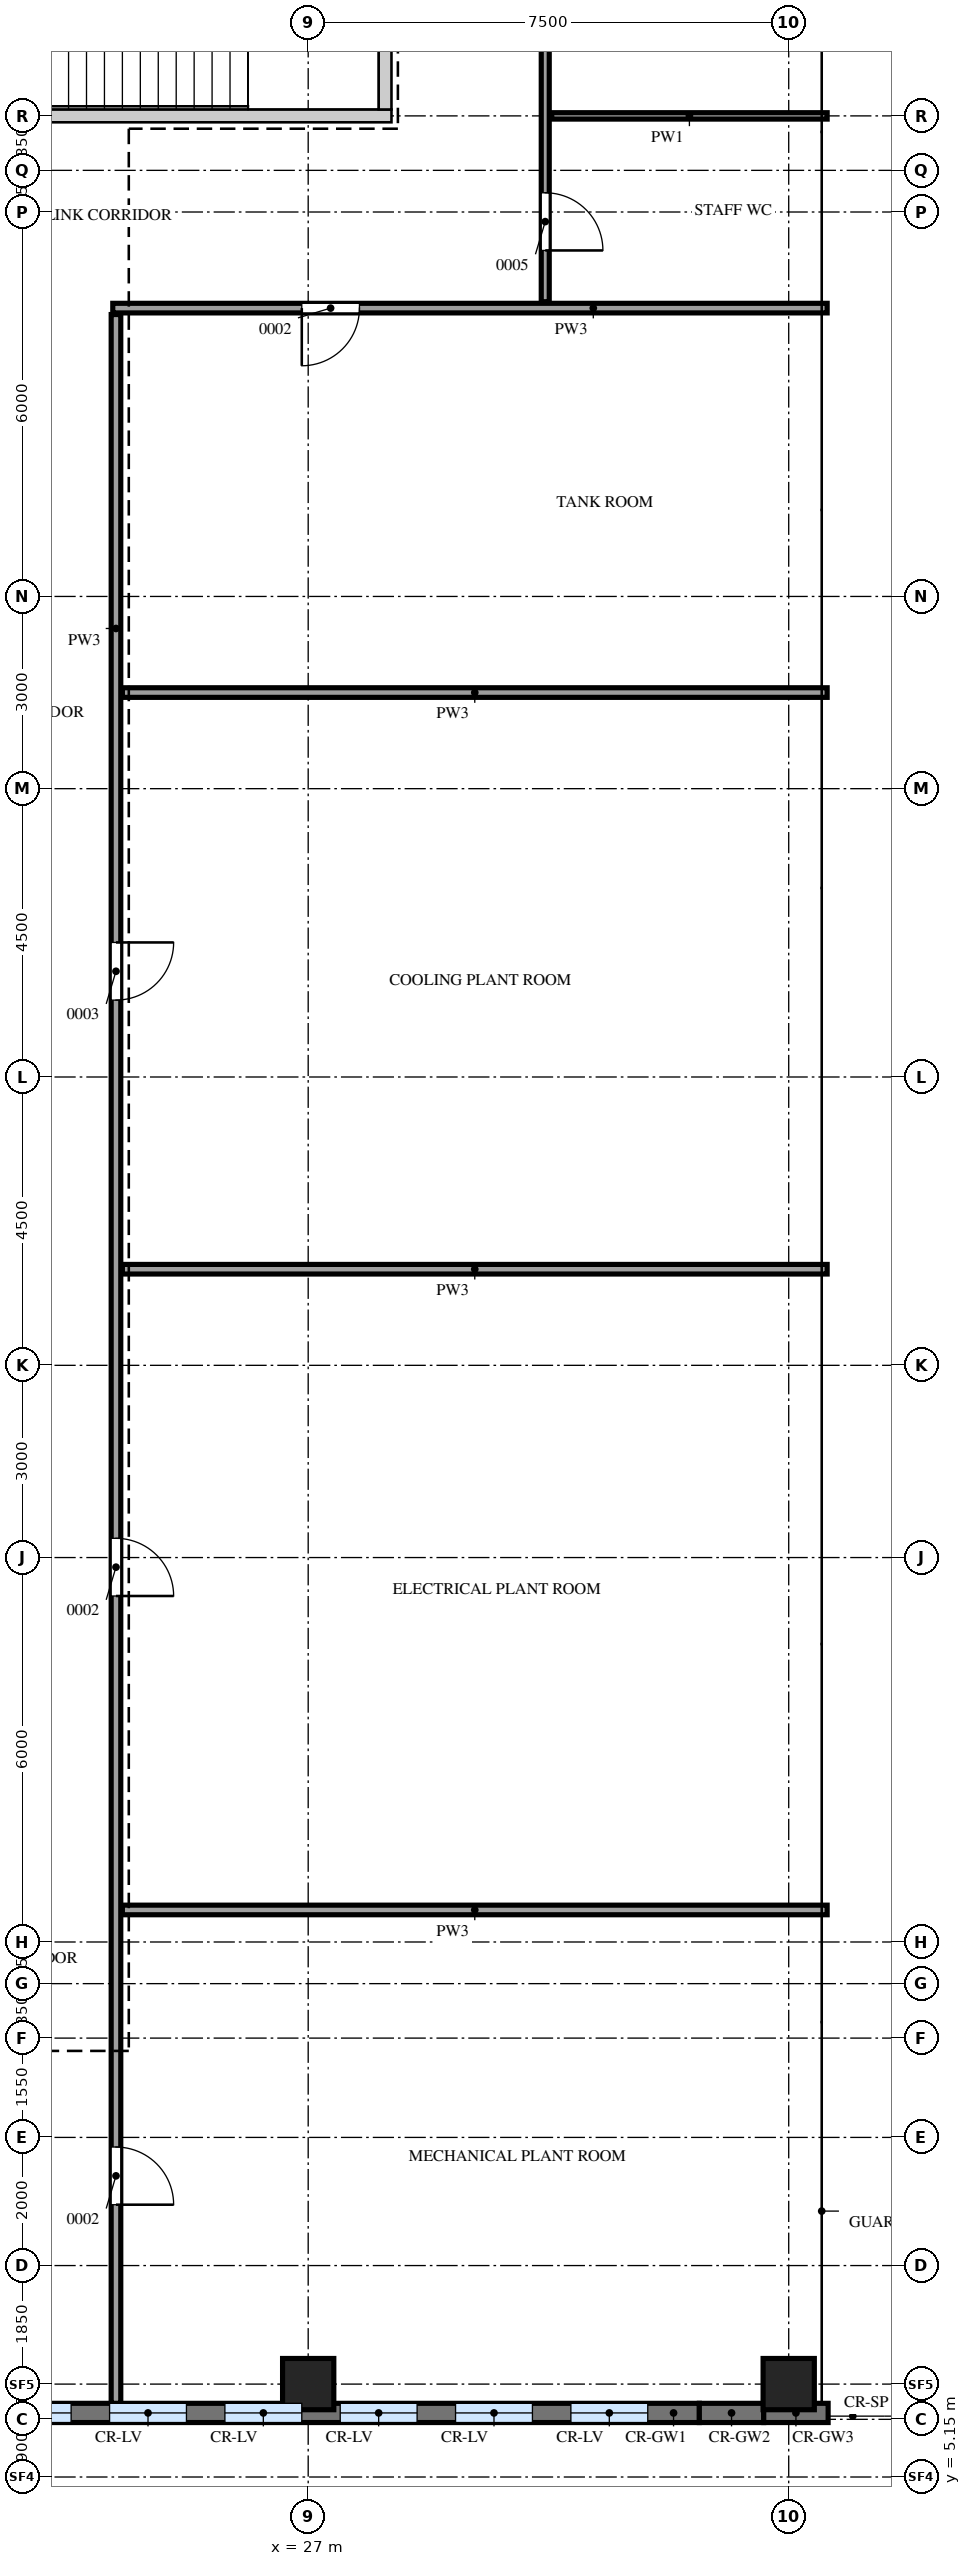
"""IFC4 building model, lengths in metres.
Left out: names, types, materials, properties, quantities, classifications, styles, units other than length and angle.
Written with IfcOpenShell. Run it as: python <this file> out.ifc"""

import sys

from ifc_helpers import new_model, si_unit, direction, frame, frame_2d, origin, origin_2d, place, context, subcontext, project, spatial, rectangle, extrude, source, transform, mapped, element, fill, save


model = new_model("IFC4")
c1 = context("Model", 3, precision=1e-05, world=origin(), true_north=direction((0.0, 1.0)))
c2 = subcontext(c1, "Body", "Model", "MODEL_VIEW")
j1 = project(units=[si_unit("LENGTHUNIT", "METRE"), si_unit("PLANEANGLEUNIT", "RADIAN")], contexts=[c1])
p1 = place(None, origin())
s1 = spatial("IfcSite", under=j1, at=p1, CompositionType="ELEMENT")
p2 = place(p1, origin())
s2 = spatial("IfcBuilding", under=s1, at=p2, CompositionType="ELEMENT")
p3 = place(p2, frame((0.0, 0.0, 334.7)))
s3 = spatial("IfcBuildingStorey", under=s2, at=p3, CompositionType="ELEMENT", Elevation=334.7)
m1 = source(origin(), c2, "Body", "SweptSolid", [
    extrude(rectangle(XDim=7.1, YDim=0.2, at=frame_2d((3.55, 0.0))), origin(), (0.0, 0.0, 1.0), 4.25),
])
p4 = place(p3, frame((21.2, 42.0, 0.0), z_axis=(0.0, 0.0, 1.0), x_axis=(1.0, 0.0, 0.0)))
e1 = element("IfcWall", 1, at=p4, inside=s3, PredefinedType="SHEAR", context=c2, shape_type="MappedRepresentation", body=[
    mapped(m1, transform((0.0, 0.0, 0.0))),
])
m2 = source(origin(), c2, "Body", "SweptSolid", [
    extrude(rectangle(XDim=3.35, YDim=0.2, at=frame_2d((1.675, 0.0))), origin(), (0.0, 0.0, 1.0), 4.25),
])
p5 = place(p3, frame((28.2, 42.1, 0.0), z_axis=(0.0, 0.0, 1.0), x_axis=(0.0, 1.0, 0.0)))
e2 = element("IfcWall", 2, at=p5, inside=s3, PredefinedType="SHEAR", context=c2, shape_type="MappedRepresentation", body=[
    mapped(m2, transform((0.0, 0.0, 0.0))),
])
m3 = source(origin(), c2, "Body", "SweptSolid", [
    extrude(rectangle(XDim=0.8, YDim=0.8, at=origin_2d()), origin(), (0.0, 0.0, 1.0), 4.5),
])
p6 = place(p3, frame((27.0, 6.6, 0.0), z_axis=(0.0, 0.0, 1.0), x_axis=(1.0, 0.0, 0.0)))
e3 = element("IfcColumn", 3, at=p6, inside=s3, PredefinedType="COLUMN", context=c2, shape_type="MappedRepresentation", body=[
    mapped(m3, transform((0.0, 0.0, 0.0))),
])
m4 = source(origin(), c2, "Body", "SweptSolid", [
    extrude(rectangle(XDim=0.8, YDim=0.8, at=origin_2d()), origin(), (0.0, 0.0, 1.0), 1.739),
])
p7 = place(p3, frame((34.5, 6.6, 0.0), z_axis=(0.0, 0.0, 1.0), x_axis=(1.0, 0.0, 0.0)))
e4 = element("IfcColumn", 4, at=p7, inside=s3, PredefinedType="COLUMN", context=c2, shape_type="MappedRepresentation", body=[
    mapped(m4, transform((0.0, 0.0, 0.0))),
])
m5 = source(origin(), c2, "Body", "SweptSolid", [
    extrude(rectangle(XDim=20.805, YDim=0.3, at=frame_2d((10.403, 0.0))), origin(), (0.0, 0.0, 1.0), 4.5),
])
p8 = place(p3, frame((12.3, 6.15, 0.0), z_axis=(0.0, 0.0, 1.0), x_axis=(1.0, 0.0, 0.0)))
e5 = element("IfcWall", 5, at=p8, inside=s3, PredefinedType="SOLIDWALL", context=c2, shape_type="MappedRepresentation", body=[
    mapped(m5, transform((0.0, 0.0, 0.0))),
])
m6 = source(origin(), c2, "Body", "SweptSolid", [
    extrude(rectangle(XDim=1.2, YDim=2.4, at=frame_2d((0.6, 1.2))), frame((0.0, 0.16, 0.0), z_axis=(0.0, -1.0, 0.0), x_axis=(1.0, 0.0, 0.0)), (0.0, 0.0, 1.0), 0.32),
])
p9 = place(p8, frame((0.8, 0.0, 0.9)))
e6 = element("IfcOpeningElement", 6, at=p9, cuts=e5, PredefinedType="OPENING", context=c2, shape_type="MappedRepresentation", body=[
    mapped(m6, transform((0.0, 0.0, 0.0))),
])
p10 = place(p8, frame((2.6, 0.0, 0.9)))
e7 = element("IfcOpeningElement", 7, at=p10, cuts=e5, PredefinedType="OPENING", context=c2, shape_type="MappedRepresentation", body=[
    mapped(m6, transform((0.0, 0.0, 0.0))),
])
p11 = place(p8, frame((4.4, 0.0, 0.9)))
e8 = element("IfcOpeningElement", 8, at=p11, cuts=e5, PredefinedType="OPENING", context=c2, shape_type="MappedRepresentation", body=[
    mapped(m6, transform((0.0, 0.0, 0.0))),
])
p12 = place(p8, frame((6.2, 0.0, 0.9)))
e9 = element("IfcOpeningElement", 9, at=p12, cuts=e5, PredefinedType="OPENING", context=c2, shape_type="MappedRepresentation", body=[
    mapped(m6, transform((0.0, 0.0, 0.0))),
])
p13 = place(p8, frame((8.0, 0.0, 0.9)))
e10 = element("IfcOpeningElement", 10, at=p13, cuts=e5, PredefinedType="OPENING", context=c2, shape_type="MappedRepresentation", body=[
    mapped(m6, transform((0.0, 0.0, 0.0))),
])
p14 = place(p8, frame((9.8, 0.0, 0.9)))
e11 = element("IfcOpeningElement", 11, at=p14, cuts=e5, PredefinedType="OPENING", context=c2, shape_type="MappedRepresentation", body=[
    mapped(m6, transform((0.0, 0.0, 0.0))),
])
p15 = place(p8, frame((11.6, 0.0, 0.9)))
e12 = element("IfcOpeningElement", 12, at=p15, cuts=e5, PredefinedType="OPENING", context=c2, shape_type="MappedRepresentation", body=[
    mapped(m6, transform((0.0, 0.0, 0.0))),
])
p16 = place(p8, frame((13.4, 0.0, 0.9)))
e13 = element("IfcOpeningElement", 13, at=p16, cuts=e5, PredefinedType="OPENING", context=c2, shape_type="MappedRepresentation", body=[
    mapped(m6, transform((0.0, 0.0, 0.0))),
])
p17 = place(p8, frame((15.2, 0.0, 0.9)))
e14 = element("IfcOpeningElement", 14, at=p17, cuts=e5, PredefinedType="OPENING", context=c2, shape_type="MappedRepresentation", body=[
    mapped(m6, transform((0.0, 0.0, 0.0))),
])
p18 = place(p8, frame((17.0, 0.0, 0.9)))
e15 = element("IfcOpeningElement", 15, at=p18, cuts=e5, PredefinedType="OPENING", context=c2, shape_type="MappedRepresentation", body=[
    mapped(m6, transform((0.0, 0.0, 0.0))),
])
p19 = place(p8, frame((18.8, 0.0, 0.9)))
e16 = element("IfcOpeningElement", 16, at=p19, cuts=e5, PredefinedType="OPENING", context=c2, shape_type="MappedRepresentation", body=[
    mapped(m6, transform((0.0, 0.0, 0.0))),
])
m7 = source(origin(), c2, "Body", "SweptSolid", [
    extrude(rectangle(XDim=1.005, YDim=0.3, at=frame_2d((0.502, 0.0))), origin(), (0.0, 0.0, 1.0), 4.05),
])
p20 = place(p3, frame((33.105, 6.15, 0.0), z_axis=(0.0, 0.0, 1.0), x_axis=(1.0, 0.0, 0.0)))
e17 = element("IfcWall", 17, at=p20, inside=s3, PredefinedType="SOLIDWALL", context=c2, shape_type="MappedRepresentation", body=[
    mapped(m7, transform((0.0, 0.0, 0.0))),
])
m8 = source(origin(), c2, "Body", "SweptSolid", [
    extrude(rectangle(XDim=1.005, YDim=0.3, at=frame_2d((0.502, 0.0))), origin(), (0.0, 0.0, 1.0), 2.3),
])
p21 = place(p3, frame((34.11, 6.15, 0.0), z_axis=(0.0, 0.0, 1.0), x_axis=(1.0, 0.0, 0.0)))
e18 = element("IfcWall", 18, at=p21, inside=s3, PredefinedType="SOLIDWALL", context=c2, shape_type="MappedRepresentation", body=[
    mapped(m8, transform((0.0, 0.0, 0.0))),
])
m9 = source(origin(), c2, "Body", "SweptSolid", [
    extrude(rectangle(XDim=32.6, YDim=0.15, at=frame_2d((16.3, 0.0))), origin(), (0.0, 0.0, 1.0), 4.3),
])
p22 = place(p3, frame((24.0, 6.3, 0.0), z_axis=(0.0, 0.0, 1.0), x_axis=(0.0, 1.0, 0.0)))
e19 = element("IfcWall", 19, at=p22, inside=s3, PredefinedType="PARTITIONING", context=c2, shape_type="MappedRepresentation", body=[
    mapped(m9, transform((0.0, 0.0, 0.0))),
])
m10 = source(origin(), c2, "Body", "SweptSolid", [
    extrude(rectangle(XDim=0.9, YDim=2.1, at=frame_2d((0.45, 1.05))), frame((0.0, 0.085, 0.0), z_axis=(0.0, -1.0, 0.0), x_axis=(1.0, 0.0, 0.0)), (0.0, 0.0, 1.0), 0.17),
])
p23 = place(p22, frame((3.1, 0.0, 0.0)))
e20 = element("IfcOpeningElement", 20, at=p23, cuts=e19, PredefinedType="OPENING", context=c2, shape_type="MappedRepresentation", body=[
    mapped(m10, transform((0.0, 0.0, 0.0))),
])
p24 = place(p22, frame((12.6, 0.0, 0.0)))
e21 = element("IfcOpeningElement", 21, at=p24, cuts=e19, PredefinedType="OPENING", context=c2, shape_type="MappedRepresentation", body=[
    mapped(m10, transform((0.0, 0.0, 0.0))),
])
p25 = place(p22, frame((21.9, 0.0, 0.0)))
e22 = element("IfcOpeningElement", 22, at=p25, cuts=e19, PredefinedType="OPENING", context=c2, shape_type="MappedRepresentation", body=[
    mapped(m10, transform((0.0, 0.0, 0.0))),
])
m11 = source(origin(), c2, "Body", "SweptSolid", [
    extrude(rectangle(XDim=11.0, YDim=0.15, at=frame_2d((5.5, 0.0))), origin(), (0.0, 0.0, 1.0), 4.3),
])
for number, where, z_axis, x_axis in (
    (23, (24.1, 14.0, 0.0), (0.0, 0.0, 1.0), (1.0, 0.0, 0.0)),
    (24, (24.1, 24.0, 0.0), (0.0, 0.0, 1.0), (1.0, 0.0, 0.0)),
    (25, (24.1, 33.0, 0.0), (0.0, 0.0, 1.0), (1.0, 0.0, 0.0)),
):
    element("IfcWall", number, at=place(p3, frame(where, z_axis=z_axis, x_axis=x_axis)), inside=s3, PredefinedType="PARTITIONING", context=c2, shape_type="MappedRepresentation", body=[
        mapped(m11, transform((0.0, 0.0, 0.0))),
    ])
m12 = source(origin(), c2, "Body", "SweptSolid", [
    extrude(rectangle(XDim=11.15, YDim=0.15, at=frame_2d((5.575, 0.0))), origin(), (0.0, 0.0, 1.0), 4.3),
])
p26 = place(p3, frame((23.95, 39.0, 0.0), z_axis=(0.0, 0.0, 1.0), x_axis=(1.0, 0.0, 0.0)))
e26 = element("IfcWall", 26, at=p26, inside=s3, PredefinedType="PARTITIONING", context=c2, shape_type="MappedRepresentation", body=[
    mapped(m12, transform((0.0, 0.0, 0.0))),
])
p27 = place(p26, frame((2.95, 0.0, 0.0)))
e27 = element("IfcOpeningElement", 27, at=p27, cuts=e26, PredefinedType="OPENING", context=c2, shape_type="MappedRepresentation", body=[
    mapped(m10, transform((0.0, 0.0, 0.0))),
])
m13 = source(origin(), c2, "Body", "SweptSolid", [
    extrude(rectangle(XDim=8.6, YDim=0.125, at=frame_2d((4.3, 0.0))), origin(), (0.0, 0.0, 1.0), 4.3),
])
p28 = place(p3, frame((30.7, 39.1, 0.0), z_axis=(0.0, 0.0, 1.0), x_axis=(0.0, 1.0, 0.0)))
e28 = element("IfcWall", 28, at=p28, inside=s3, PredefinedType="PARTITIONING", context=c2, shape_type="MappedRepresentation", body=[
    mapped(m13, transform((0.0, 0.0, 0.0))),
])
m14 = source(origin(), c2, "Body", "SweptSolid", [
    extrude(rectangle(XDim=0.9, YDim=2.1, at=frame_2d((0.45, 1.05))), frame((0.0, 0.073, 0.0), z_axis=(0.0, -1.0, 0.0), x_axis=(1.0, 0.0, 0.0)), (0.0, 0.0, 1.0), 0.145),
])
p29 = place(p28, frame((0.8, 0.0, 0.0)))
e29 = element("IfcOpeningElement", 29, at=p29, cuts=e28, PredefinedType="OPENING", context=c2, shape_type="MappedRepresentation", body=[
    mapped(m14, transform((0.0, 0.0, 0.0))),
])
m15 = source(origin(), c2, "Body", "SweptSolid", [
    extrude(rectangle(XDim=1.2, YDim=2.1, at=frame_2d((0.6, 1.05))), frame((0.0, 0.073, 0.0), z_axis=(0.0, -1.0, 0.0), x_axis=(1.0, 0.0, 0.0)), (0.0, 0.0, 1.0), 0.145),
])
p30 = place(p28, frame((4.1, 0.0, 0.0)))
e30 = element("IfcOpeningElement", 30, at=p30, cuts=e28, PredefinedType="OPENING", context=c2, shape_type="MappedRepresentation", body=[
    mapped(m15, transform((0.0, 0.0, 0.0))),
])
m16 = source(origin(), c2, "Body", "SweptSolid", [
    extrude(rectangle(XDim=4.3, YDim=0.1, at=frame_2d((2.15, 0.0))), origin(), (0.0, 0.0, 1.0), 4.3),
])
p31 = place(p3, frame((30.8, 42.0, 0.0), z_axis=(0.0, 0.0, 1.0), x_axis=(1.0, 0.0, 0.0)))
e31 = element("IfcWall", 31, at=p31, inside=s3, PredefinedType="PARTITIONING", context=c2, shape_type="MappedRepresentation", body=[
    mapped(m16, transform((0.0, 0.0, 0.0))),
])
m17 = source(origin(), c2, "Body", "SweptSolid", [
    extrude(rectangle(XDim=1.2, YDim=2.4, at=frame_2d((0.6, 1.2))), frame((0.0, 0.03, 0.0), z_axis=(0.0, -1.0, 0.0), x_axis=(1.0, 0.0, 0.0)), (0.0, 0.0, 1.0), 0.06),
])
p32 = place(p14, origin())
e32 = element("IfcWindow", 32, at=p32, inside=s3, PartitioningType="SINGLE_PANEL", PredefinedType="WINDOW", context=c2, shape_type="MappedRepresentation", body=[
    mapped(m17, transform((0.0, 0.0, 0.0))),
])
fill(e11, e32)
p33 = place(p15, origin())
e33 = element("IfcWindow", 33, at=p33, inside=s3, PartitioningType="SINGLE_PANEL", PredefinedType="WINDOW", context=c2, shape_type="MappedRepresentation", body=[
    mapped(m17, transform((0.0, 0.0, 0.0))),
])
fill(e12, e33)
p34 = place(p16, origin())
e34 = element("IfcWindow", 34, at=p34, inside=s3, PartitioningType="SINGLE_PANEL", PredefinedType="WINDOW", context=c2, shape_type="MappedRepresentation", body=[
    mapped(m17, transform((0.0, 0.0, 0.0))),
])
fill(e13, e34)
p35 = place(p17, origin())
e35 = element("IfcWindow", 35, at=p35, inside=s3, PartitioningType="SINGLE_PANEL", PredefinedType="WINDOW", context=c2, shape_type="MappedRepresentation", body=[
    mapped(m17, transform((0.0, 0.0, 0.0))),
])
fill(e14, e35)
p36 = place(p18, origin())
e36 = element("IfcWindow", 36, at=p36, inside=s3, PartitioningType="SINGLE_PANEL", PredefinedType="WINDOW", context=c2, shape_type="MappedRepresentation", body=[
    mapped(m17, transform((0.0, 0.0, 0.0))),
])
fill(e15, e36)
p37 = place(p19, origin())
e37 = element("IfcWindow", 37, at=p37, inside=s3, PartitioningType="SINGLE_PANEL", PredefinedType="WINDOW", context=c2, shape_type="MappedRepresentation", body=[
    mapped(m17, transform((0.0, 0.0, 0.0))),
])
fill(e16, e37)
m18 = source(origin(), c2, "Body", "SweptSolid", [
    extrude(rectangle(XDim=0.9, YDim=2.1, at=frame_2d((0.45, 1.05))), frame((0.0, 0.025, 0.0), z_axis=(0.0, -1.0, 0.0), x_axis=(1.0, 0.0, 0.0)), (0.0, 0.0, 1.0), 0.05),
])
p38 = place(p23, origin())
e38 = element("IfcDoor", 38, at=p38, inside=s3, OperationType="SINGLE_SWING_LEFT", PredefinedType="DOOR", context=c2, shape_type="MappedRepresentation", body=[
    mapped(m18, transform((0.0, 0.0, 0.0))),
])
fill(e20, e38)
p39 = place(p24, origin())
e39 = element("IfcDoor", 39, at=p39, inside=s3, OperationType="SINGLE_SWING_LEFT", PredefinedType="DOOR", context=c2, shape_type="MappedRepresentation", body=[
    mapped(m18, transform((0.0, 0.0, 0.0))),
])
fill(e21, e39)
p40 = place(p25, origin())
e40 = element("IfcDoor", 40, at=p40, inside=s3, OperationType="SINGLE_SWING_RIGHT", PredefinedType="DOOR", context=c2, shape_type="MappedRepresentation", body=[
    mapped(m18, transform((0.0, 0.0, 0.0))),
])
fill(e22, e40)
p41 = place(p27, origin())
e41 = element("IfcDoor", 41, at=p41, inside=s3, OperationType="SINGLE_SWING_LEFT", PredefinedType="DOOR", context=c2, shape_type="MappedRepresentation", body=[
    mapped(m18, transform((0.0, 0.0, 0.0))),
])
fill(e27, e41)
p42 = place(p29, origin())
e42 = element("IfcDoor", 42, at=p42, inside=s3, OperationType="SINGLE_SWING_LEFT", PredefinedType="DOOR", context=c2, shape_type="MappedRepresentation", body=[
    mapped(m18, transform((0.0, 0.0, 0.0))),
])
fill(e29, e42)
save(model, sys.argv[1])
